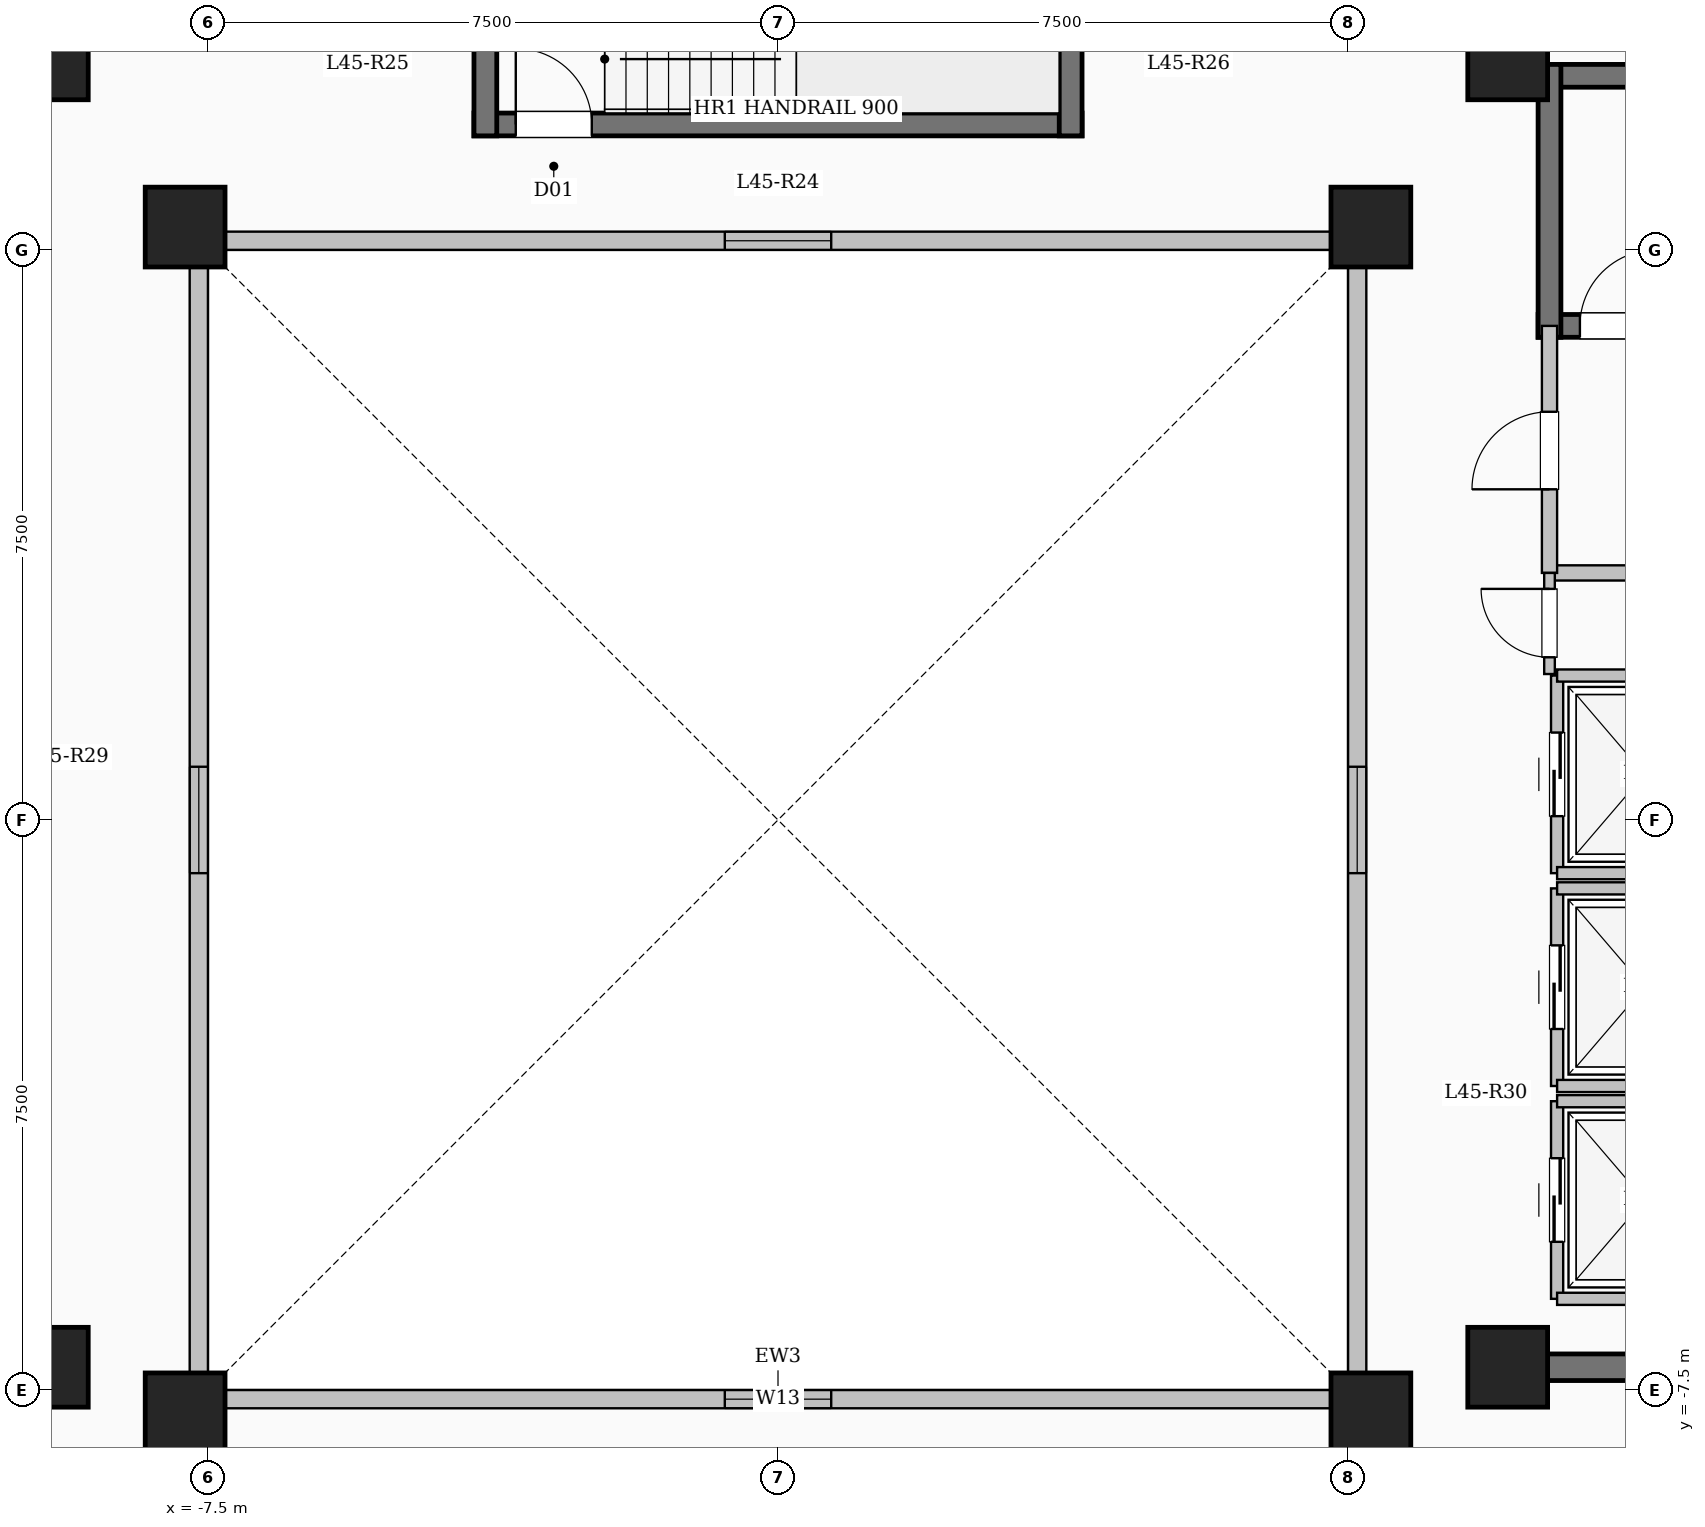
"""IFC4 building model, lengths in metres.
Left out: names, types, materials, properties, quantities, classifications, styles, units other than length and angle.
Written with IfcOpenShell. Run it as: python <this file> out.ifc"""

import sys

from ifc_helpers import new_model, si_unit, direction, frame, frame_2d, origin, origin_2d, place, context, subcontext, project, spatial, rectangle, extrude, element, fill, save


model = new_model("IFC4")
c1 = context("Model", 3, precision=1e-05, world=origin(), true_north=direction((0.0, 1.0)))
c2 = subcontext(c1, "Body", "Model", "MODEL_VIEW")
j1 = project(units=[si_unit("LENGTHUNIT", "METRE"), si_unit("PLANEANGLEUNIT", "RADIAN")], contexts=[c1])
p1 = place(None, origin())
s1 = spatial("IfcSite", under=j1, at=p1, CompositionType="ELEMENT")
p2 = place(p1, origin())
s2 = spatial("IfcBuilding", under=s1, at=p2, CompositionType="ELEMENT")
p3 = place(p2, frame((0.0, 0.0, 166.1)))
s3 = spatial("IfcBuildingStorey", under=s2, at=p3, CompositionType="ELEMENT", Elevation=166.1)
for number, where, z_axis, x_axis in (
    (1, (-7.8, -7.8, 0.0), (0.0, 0.0, 1.0), (1.0, 0.0, 0.0)),
    (2, (7.8, -7.8, 0.0), (0.0, 0.0, 1.0), (1.0, 0.0, 0.0)),
    (3, (-7.8, 7.8, 0.0), (0.0, 0.0, 1.0), (1.0, 0.0, 0.0)),
    (4, (7.8, 7.8, 0.0), (0.0, 0.0, 1.0), (1.0, 0.0, 0.0)),
    (5, (-9.6, -7.2, 0.0), (0.0, 0.0, 1.0), (1.0, 0.0, 0.0)),
    (6, (-9.6, 10.0, 0.0), (0.0, 0.0, 1.0), (1.0, 0.0, 0.0)),
    (7, (9.6, -7.2, 0.0), (0.0, 0.0, 1.0), (1.0, 0.0, 0.0)),
    (8, (9.6, 10.0, 0.0), (0.0, 0.0, 1.0), (1.0, 0.0, 0.0)),
):
    element("IfcColumn", number, at=place(p3, frame(where, z_axis=z_axis, x_axis=x_axis)), inside=s3, PredefinedType="COLUMN", context=c2, shape_type="SweptSolid", body=[
        extrude(rectangle(XDim=1.05, YDim=1.05, at=origin_2d()), origin(), (0.0, 0.0, 1.0), 3.35),
    ])
p4 = place(p3, frame((-7.62, -7.62, 0.0), z_axis=(0.0, 0.0, 1.0), x_axis=(1.0, 0.0, 0.0)))
e9 = element("IfcWall", 9, at=p4, inside=s3, PredefinedType="SOLIDWALL", context=c2, shape_type="SweptSolid", body=[
    extrude(rectangle(XDim=15.24, YDim=0.24, at=frame_2d((7.62, 0.0))), origin(), (0.0, 0.0, 1.0), 3.1),
])
p5 = place(p4, frame((6.92, 0.0, 0.95)))
e10 = element("IfcOpeningElement", 10, at=p5, cuts=e9, PredefinedType="OPENING", context=c2, shape_type="SweptSolid", body=[
    extrude(rectangle(XDim=1.4, YDim=1.5, at=frame_2d((0.7, 0.75))), frame((0.0, 0.13, 0.0), z_axis=(0.0, -1.0, 0.0), x_axis=(1.0, 0.0, 0.0)), (0.0, 0.0, 1.0), 0.26),
])
p6 = place(p3, frame((7.62, -7.62, 0.0), z_axis=(0.0, 0.0, 1.0), x_axis=(0.0, 1.0, 0.0)))
e11 = element("IfcWall", 11, at=p6, inside=s3, PredefinedType="SOLIDWALL", context=c2, shape_type="SweptSolid", body=[
    extrude(rectangle(XDim=15.24, YDim=0.24, at=frame_2d((7.62, 0.0))), origin(), (0.0, 0.0, 1.0), 3.1),
])
p7 = place(p6, frame((6.92, 0.0, 0.95)))
e12 = element("IfcOpeningElement", 12, at=p7, cuts=e11, PredefinedType="OPENING", context=c2, shape_type="SweptSolid", body=[
    extrude(rectangle(XDim=1.4, YDim=1.5, at=frame_2d((0.7, 0.75))), frame((0.0, 0.13, 0.0), z_axis=(0.0, -1.0, 0.0), x_axis=(1.0, 0.0, 0.0)), (0.0, 0.0, 1.0), 0.26),
])
p8 = place(p3, frame((7.62, 7.62, 0.0), z_axis=(0.0, 0.0, 1.0), x_axis=(-1.0, 0.0, 0.0)))
e13 = element("IfcWall", 13, at=p8, inside=s3, PredefinedType="SOLIDWALL", context=c2, shape_type="SweptSolid", body=[
    extrude(rectangle(XDim=15.24, YDim=0.24, at=frame_2d((7.62, 0.0))), origin(), (0.0, 0.0, 1.0), 3.1),
])
p9 = place(p8, frame((6.92, 0.0, 0.95)))
e14 = element("IfcOpeningElement", 14, at=p9, cuts=e13, PredefinedType="OPENING", context=c2, shape_type="SweptSolid", body=[
    extrude(rectangle(XDim=1.4, YDim=1.5, at=frame_2d((0.7, 0.75))), frame((0.0, 0.13, 0.0), z_axis=(0.0, -1.0, 0.0), x_axis=(1.0, 0.0, 0.0)), (0.0, 0.0, 1.0), 0.26),
])
p10 = place(p3, frame((-7.62, 7.62, 0.0), z_axis=(0.0, 0.0, 1.0), x_axis=(0.0, -1.0, 0.0)))
e15 = element("IfcWall", 15, at=p10, inside=s3, PredefinedType="SOLIDWALL", context=c2, shape_type="SweptSolid", body=[
    extrude(rectangle(XDim=15.24, YDim=0.24, at=frame_2d((7.62, 0.0))), origin(), (0.0, 0.0, 1.0), 3.1),
])
p11 = place(p10, frame((6.92, 0.0, 0.95)))
e16 = element("IfcOpeningElement", 16, at=p11, cuts=e15, PredefinedType="OPENING", context=c2, shape_type="SweptSolid", body=[
    extrude(rectangle(XDim=1.4, YDim=1.5, at=frame_2d((0.7, 0.75))), frame((0.0, 0.13, 0.0), z_axis=(0.0, -1.0, 0.0), x_axis=(1.0, 0.0, 0.0)), (0.0, 0.0, 1.0), 0.26),
])
p12 = place(p3, frame((10.0, 9.79, 0.0), z_axis=(0.0, 0.0, 1.0), x_axis=(1.0, 0.0, 0.0)))
e17 = element("IfcWall", 17, at=p12, inside=s3, PredefinedType="SHEAR", context=c2, shape_type="SweptSolid", body=[
    extrude(rectangle(XDim=8.0, YDim=0.3, at=frame_2d((4.0, 0.0))), origin(), (0.0, 0.0, 1.0), 3.35),
])
p13 = place(p3, frame((10.0, 6.5, 0.0), z_axis=(0.0, 0.0, 1.0), x_axis=(1.0, 0.0, 0.0)))
e18 = element("IfcWall", 18, at=p13, inside=s3, PredefinedType="SHEAR", context=c2, shape_type="SweptSolid", body=[
    extrude(rectangle(XDim=8.0, YDim=0.3, at=frame_2d((4.0, 0.0))), origin(), (0.0, 0.0, 1.0), 3.35),
])
p14 = place(p13, frame((0.55, 0.0, 0.0)))
e19 = element("IfcOpeningElement", 19, at=p14, cuts=e18, PredefinedType="OPENING", context=c2, shape_type="SweptSolid", body=[
    extrude(rectangle(XDim=1.0, YDim=2.15, at=frame_2d((0.5, 1.075))), frame((0.0, 0.16, 0.0), z_axis=(0.0, -1.0, 0.0), x_axis=(1.0, 0.0, 0.0)), (0.0, 0.0, 1.0), 0.32),
])
p15 = place(p3, frame((10.15, 6.35, 0.0), z_axis=(0.0, 0.0, 1.0), x_axis=(0.0, 1.0, 0.0)))
e20 = element("IfcWall", 20, at=p15, inside=s3, PredefinedType="SHEAR", context=c2, shape_type="SweptSolid", body=[
    extrude(rectangle(XDim=3.59, YDim=0.3, at=frame_2d((1.795, 0.0))), origin(), (0.0, 0.0, 1.0), 3.35),
])
p16 = place(p3, frame((-4.0, 9.15, 0.0), z_axis=(0.0, 0.0, 1.0), x_axis=(1.0, 0.0, 0.0)))
e21 = element("IfcWall", 21, at=p16, inside=s3, PredefinedType="SHEAR", context=c2, shape_type="SweptSolid", body=[
    extrude(rectangle(XDim=8.0, YDim=0.3, at=frame_2d((4.0, 0.0))), origin(), (0.0, 0.0, 1.0), 3.35),
])
p17 = place(p16, frame((0.55, 0.0, 0.0)))
e22 = element("IfcOpeningElement", 22, at=p17, cuts=e21, PredefinedType="OPENING", context=c2, shape_type="SweptSolid", body=[
    extrude(rectangle(XDim=1.0, YDim=2.15, at=frame_2d((0.5, 1.075))), frame((0.0, 0.16, 0.0), z_axis=(0.0, -1.0, 0.0), x_axis=(1.0, 0.0, 0.0)), (0.0, 0.0, 1.0), 0.32),
])
for number, where, z_axis, x_axis in (
    (23, (-3.85, 9.0, 0.0), (0.0, 0.0, 1.0), (0.0, 1.0, 0.0)),
    (24, (3.85, 9.0, 0.0), (0.0, 0.0, 1.0), (0.0, 1.0, 0.0)),
):
    element("IfcWall", number, at=place(p3, frame(where, z_axis=z_axis, x_axis=x_axis)), inside=s3, PredefinedType="SHEAR", context=c2, shape_type="SweptSolid", body=[
        extrude(rectangle(XDim=3.59, YDim=0.3, at=frame_2d((1.795, 0.0))), origin(), (0.0, 0.0, 1.0), 3.35),
    ])
p18 = place(p3, frame((10.15, 3.25, 0.0), z_axis=(0.0, 0.0, 1.0), x_axis=(1.0, 0.0, 0.0)))
e25 = element("IfcWall", 25, at=p18, inside=s3, PredefinedType="SOLIDWALL", context=c2, shape_type="SweptSolid", body=[
    extrude(rectangle(XDim=5.4, YDim=0.2, at=frame_2d((2.7, 0.0))), origin(), (0.0, 0.0, 1.0), 3.1),
])
p19 = place(p3, frame((10.15, 3.25, 0.0), z_axis=(0.0, 0.0, 1.0), x_axis=(0.0, 1.0, 0.0)))
e26 = element("IfcWall", 26, at=p19, inside=s3, PredefinedType="SOLIDWALL", context=c2, shape_type="SweptSolid", body=[
    extrude(rectangle(XDim=3.25, YDim=0.2, at=frame_2d((1.625, 0.0))), origin(), (0.0, 0.0, 1.0), 3.1),
])
p20 = place(p19, frame((1.1, 0.0, 0.0)))
e27 = element("IfcOpeningElement", 27, at=p20, cuts=e26, PredefinedType="OPENING", context=c2, shape_type="SweptSolid", body=[
    extrude(rectangle(XDim=1.02, YDim=2.15, at=frame_2d((0.51, 1.075))), frame((0.0, 0.11, 0.0), z_axis=(0.0, -1.0, 0.0), x_axis=(1.0, 0.0, 0.0)), (0.0, 0.0, 1.0), 0.22),
])
p21 = place(p3, frame((10.25, -6.3, 0.0), z_axis=(0.0, 0.0, 1.0), x_axis=(0.0, 1.0, 0.0)))
e28 = element("IfcWall", 28, at=p21, inside=s3, PredefinedType="SOLIDWALL", context=c2, shape_type="SweptSolid", body=[
    extrude(rectangle(XDim=2.6, YDim=0.16, at=frame_2d((1.3, 0.0))), origin(), (0.0, 0.0, 1.0), 3.1),
])
p22 = place(p21, frame((0.75, 0.0, 0.0)))
e29 = element("IfcOpeningElement", 29, at=p22, cuts=e28, PredefinedType="OPENING", context=c2, shape_type="SweptSolid", body=[
    extrude(rectangle(XDim=1.1, YDim=2.15, at=frame_2d((0.55, 1.075))), frame((0.0, 0.09, 0.0), z_axis=(0.0, -1.0, 0.0), x_axis=(1.0, 0.0, 0.0)), (0.0, 0.0, 1.0), 0.18),
])
for number, where, z_axis, x_axis in (
    (30, (10.25, -6.3, 0.0), (0.0, 0.0, 1.0), (1.0, 0.0, 0.0)),
    (31, (10.25, -3.7, 0.0), (0.0, 0.0, 1.0), (1.0, 0.0, 0.0)),
):
    element("IfcWall", number, at=place(p3, frame(where, z_axis=z_axis, x_axis=x_axis)), inside=s3, PredefinedType="SOLIDWALL", context=c2, shape_type="SweptSolid", body=[
        extrude(rectangle(XDim=2.3, YDim=0.16, at=frame_2d((1.15, 0.0))), origin(), (0.0, 0.0, 1.0), 3.1),
    ])
p23 = place(p3, frame((10.25, -3.5, 0.0), z_axis=(0.0, 0.0, 1.0), x_axis=(0.0, 1.0, 0.0)))
e32 = element("IfcWall", 32, at=p23, inside=s3, PredefinedType="SOLIDWALL", context=c2, shape_type="SweptSolid", body=[
    extrude(rectangle(XDim=2.6, YDim=0.16, at=frame_2d((1.3, 0.0))), origin(), (0.0, 0.0, 1.0), 3.1),
])
p24 = place(p23, frame((0.75, 0.0, 0.0)))
e33 = element("IfcOpeningElement", 33, at=p24, cuts=e32, PredefinedType="OPENING", context=c2, shape_type="SweptSolid", body=[
    extrude(rectangle(XDim=1.1, YDim=2.15, at=frame_2d((0.55, 1.075))), frame((0.0, 0.09, 0.0), z_axis=(0.0, -1.0, 0.0), x_axis=(1.0, 0.0, 0.0)), (0.0, 0.0, 1.0), 0.18),
])
for number, where, z_axis, x_axis in (
    (34, (10.25, -3.5, 0.0), (0.0, 0.0, 1.0), (1.0, 0.0, 0.0)),
    (35, (10.25, -0.9, 0.0), (0.0, 0.0, 1.0), (1.0, 0.0, 0.0)),
):
    element("IfcWall", number, at=place(p3, frame(where, z_axis=z_axis, x_axis=x_axis)), inside=s3, PredefinedType="SOLIDWALL", context=c2, shape_type="SweptSolid", body=[
        extrude(rectangle(XDim=2.3, YDim=0.16, at=frame_2d((1.15, 0.0))), origin(), (0.0, 0.0, 1.0), 3.1),
    ])
p25 = place(p3, frame((10.25, -0.7, 0.0), z_axis=(0.0, 0.0, 1.0), x_axis=(0.0, 1.0, 0.0)))
e36 = element("IfcWall", 36, at=p25, inside=s3, PredefinedType="SOLIDWALL", context=c2, shape_type="SweptSolid", body=[
    extrude(rectangle(XDim=2.6, YDim=0.16, at=frame_2d((1.3, 0.0))), origin(), (0.0, 0.0, 1.0), 3.1),
])
p26 = place(p25, frame((0.75, 0.0, 0.0)))
e37 = element("IfcOpeningElement", 37, at=p26, cuts=e36, PredefinedType="OPENING", context=c2, shape_type="SweptSolid", body=[
    extrude(rectangle(XDim=1.1, YDim=2.15, at=frame_2d((0.55, 1.075))), frame((0.0, 0.09, 0.0), z_axis=(0.0, -1.0, 0.0), x_axis=(1.0, 0.0, 0.0)), (0.0, 0.0, 1.0), 0.18),
])
for number, where, z_axis, x_axis in (
    (38, (10.25, -0.7, 0.0), (0.0, 0.0, 1.0), (1.0, 0.0, 0.0)),
    (39, (10.25, 1.9, 0.0), (0.0, 0.0, 1.0), (1.0, 0.0, 0.0)),
):
    element("IfcWall", number, at=place(p3, frame(where, z_axis=z_axis, x_axis=x_axis)), inside=s3, PredefinedType="SOLIDWALL", context=c2, shape_type="SweptSolid", body=[
        extrude(rectangle(XDim=2.3, YDim=0.16, at=frame_2d((1.15, 0.0))), origin(), (0.0, 0.0, 1.0), 3.1),
    ])
p27 = place(p3, frame((10.075, -7.2, 0.0), z_axis=(0.0, 0.0, 1.0), x_axis=(1.0, 0.0, 0.0)))
e40 = element("IfcWall", 40, at=p27, inside=s3, PredefinedType="SHEAR", context=c2, shape_type="SweptSolid", body=[
    extrude(rectangle(XDim=8.55, YDim=0.35, at=frame_2d((4.275, 0.0))), origin(), (0.0, 0.0, 1.0), 3.35),
])
p28 = place(p3, frame((10.15, 1.92, 0.0), z_axis=(0.0, 0.0, 1.0), x_axis=(0.0, 1.0, 0.0)))
e41 = element("IfcWall", 41, at=p28, inside=s3, PredefinedType="PARTITIONING", context=c2, shape_type="SweptSolid", body=[
    extrude(rectangle(XDim=1.33, YDim=0.14, at=frame_2d((0.665, 0.0))), origin(), (0.0, 0.0, 1.0), 3.1),
])
p29 = place(p28, frame((0.22, 0.0, 0.0)))
e42 = element("IfcOpeningElement", 42, at=p29, cuts=e41, PredefinedType="OPENING", context=c2, shape_type="SweptSolid", body=[
    extrude(rectangle(XDim=0.9, YDim=2.08, at=frame_2d((0.45, 1.04))), frame((0.0, 0.08, 0.0), z_axis=(0.0, -1.0, 0.0), x_axis=(1.0, 0.0, 0.0)), (0.0, 0.0, 1.0), 0.16),
])
p30 = place(p5, origin())
e43 = element("IfcWindow", 43, at=p30, inside=s3, PartitioningType="SINGLE_PANEL", PredefinedType="WINDOW", context=c2, shape_type="SweptSolid", body=[
    extrude(rectangle(XDim=1.4, YDim=1.5, at=frame_2d((0.7, 0.75))), frame((0.0, 0.03, 0.0), z_axis=(0.0, -1.0, 0.0), x_axis=(1.0, 0.0, 0.0)), (0.0, 0.0, 1.0), 0.06),
])
fill(e10, e43)
p31 = place(p7, origin())
e44 = element("IfcWindow", 44, at=p31, inside=s3, PartitioningType="SINGLE_PANEL", PredefinedType="WINDOW", context=c2, shape_type="SweptSolid", body=[
    extrude(rectangle(XDim=1.4, YDim=1.5, at=frame_2d((0.7, 0.75))), frame((0.0, 0.03, 0.0), z_axis=(0.0, -1.0, 0.0), x_axis=(1.0, 0.0, 0.0)), (0.0, 0.0, 1.0), 0.06),
])
fill(e12, e44)
p32 = place(p9, origin())
e45 = element("IfcWindow", 45, at=p32, inside=s3, PartitioningType="SINGLE_PANEL", PredefinedType="WINDOW", context=c2, shape_type="SweptSolid", body=[
    extrude(rectangle(XDim=1.4, YDim=1.5, at=frame_2d((0.7, 0.75))), frame((0.0, 0.03, 0.0), z_axis=(0.0, -1.0, 0.0), x_axis=(1.0, 0.0, 0.0)), (0.0, 0.0, 1.0), 0.06),
])
fill(e14, e45)
p33 = place(p11, origin())
e46 = element("IfcWindow", 46, at=p33, inside=s3, PartitioningType="SINGLE_PANEL", PredefinedType="WINDOW", context=c2, shape_type="SweptSolid", body=[
    extrude(rectangle(XDim=1.4, YDim=1.5, at=frame_2d((0.7, 0.75))), frame((0.0, 0.03, 0.0), z_axis=(0.0, -1.0, 0.0), x_axis=(1.0, 0.0, 0.0)), (0.0, 0.0, 1.0), 0.06),
])
fill(e16, e46)
p34 = place(p14, origin())
e47 = element("IfcDoor", 47, at=p34, inside=s3, OperationType="SINGLE_SWING_RIGHT", PredefinedType="DOOR", context=c2, shape_type="SweptSolid", body=[
    extrude(rectangle(XDim=1.0, YDim=2.15, at=frame_2d((0.5, 1.075))), frame((0.0, 0.025, 0.0), z_axis=(0.0, -1.0, 0.0), x_axis=(1.0, 0.0, 0.0)), (0.0, 0.0, 1.0), 0.05),
])
fill(e19, e47)
p35 = place(p17, origin())
e48 = element("IfcDoor", 48, at=p35, inside=s3, OperationType="SINGLE_SWING_LEFT", PredefinedType="DOOR", context=c2, shape_type="SweptSolid", body=[
    extrude(rectangle(XDim=1.0, YDim=2.15, at=frame_2d((0.5, 1.075))), frame((0.0, 0.025, 0.0), z_axis=(0.0, -1.0, 0.0), x_axis=(1.0, 0.0, 0.0)), (0.0, 0.0, 1.0), 0.05),
])
fill(e22, e48)
p36 = place(p20, origin())
e49 = element("IfcDoor", 49, at=p36, inside=s3, OperationType="SINGLE_SWING_LEFT", PredefinedType="DOOR", context=c2, shape_type="SweptSolid", body=[
    extrude(rectangle(XDim=1.02, YDim=2.15, at=frame_2d((0.51, 1.075))), frame((0.0, 0.025, 0.0), z_axis=(0.0, -1.0, 0.0), x_axis=(1.0, 0.0, 0.0)), (0.0, 0.0, 1.0), 0.05),
])
fill(e27, e49)
p37 = place(p22, origin())
e50 = element("IfcDoor", 50, at=p37, inside=s3, OperationType="SLIDING_TO_LEFT", PredefinedType="DOOR", context=c2, shape_type="SweptSolid", body=[
    extrude(rectangle(XDim=1.1, YDim=2.15, at=frame_2d((0.55, 1.075))), frame((0.0, 0.025, 0.0), z_axis=(0.0, -1.0, 0.0), x_axis=(1.0, 0.0, 0.0)), (0.0, 0.0, 1.0), 0.05),
])
fill(e29, e50)
p38 = place(p24, origin())
e51 = element("IfcDoor", 51, at=p38, inside=s3, OperationType="SLIDING_TO_LEFT", PredefinedType="DOOR", context=c2, shape_type="SweptSolid", body=[
    extrude(rectangle(XDim=1.1, YDim=2.15, at=frame_2d((0.55, 1.075))), frame((0.0, 0.025, 0.0), z_axis=(0.0, -1.0, 0.0), x_axis=(1.0, 0.0, 0.0)), (0.0, 0.0, 1.0), 0.05),
])
fill(e33, e51)
p39 = place(p26, origin())
e52 = element("IfcDoor", 52, at=p39, inside=s3, OperationType="SLIDING_TO_LEFT", PredefinedType="DOOR", context=c2, shape_type="SweptSolid", body=[
    extrude(rectangle(XDim=1.1, YDim=2.15, at=frame_2d((0.55, 1.075))), frame((0.0, 0.025, 0.0), z_axis=(0.0, -1.0, 0.0), x_axis=(1.0, 0.0, 0.0)), (0.0, 0.0, 1.0), 0.05),
])
fill(e37, e52)
p40 = place(p29, origin())
e53 = element("IfcDoor", 53, at=p40, inside=s3, OperationType="SINGLE_SWING_RIGHT", PredefinedType="DOOR", context=c2, shape_type="SweptSolid", body=[
    extrude(rectangle(XDim=0.9, YDim=2.08, at=frame_2d((0.45, 1.04))), frame((0.0, 0.025, 0.0), z_axis=(0.0, -1.0, 0.0), x_axis=(1.0, 0.0, 0.0)), (0.0, 0.0, 1.0), 0.05),
])
fill(e42, e53)
save(model, sys.argv[1])
